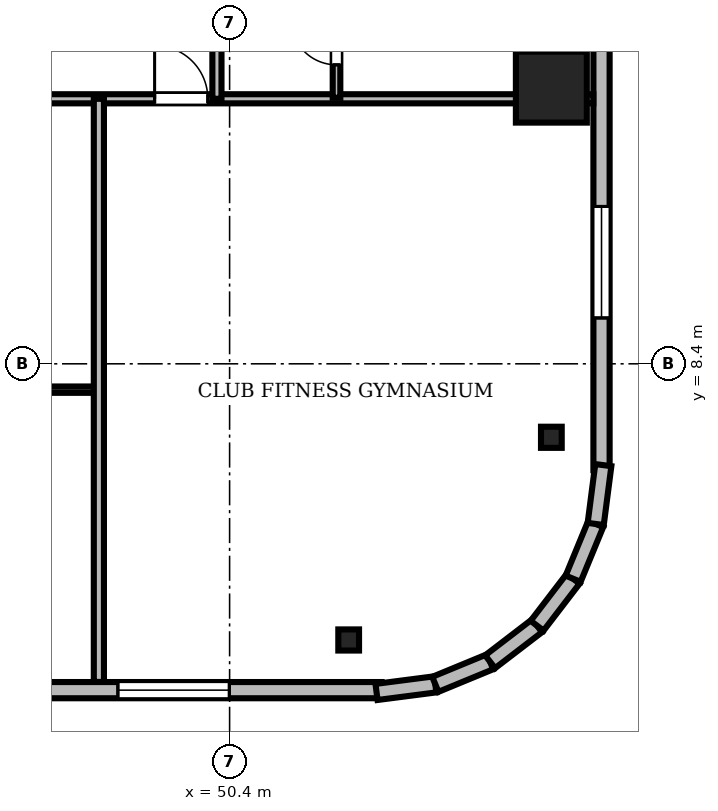
"""IFC4 building model, lengths in metres.
Left out: names, types, materials, properties, quantities, classifications, styles, units other than length and angle.
Written with IfcOpenShell. Run it as: python <this file> out.ifc"""

import sys

from ifc_helpers import new_model, si_unit, direction, frame, frame_2d, origin, origin_2d, place, context, subcontext, project, spatial, rectangle, i_section, extrude, source, transform, mapped, element, fill, save


model = new_model("IFC4")
c1 = context("Model", 3, precision=1e-05, world=origin(), true_north=direction((0.0, 1.0)))
c2 = subcontext(c1, "Body", "Model", "MODEL_VIEW")
j1 = project(units=[si_unit("LENGTHUNIT", "METRE"), si_unit("PLANEANGLEUNIT", "RADIAN")], contexts=[c1])
p1 = place(None, origin())
s1 = spatial("IfcSite", under=j1, at=p1, CompositionType="ELEMENT")
p2 = place(p1, origin())
s2 = spatial("IfcBuilding", under=s1, at=p2, CompositionType="ELEMENT")
p3 = place(p2, frame((0.0, 0.0, 199.8)))
s3 = spatial("IfcBuildingStorey", under=s2, at=p3, CompositionType="ELEMENT", Elevation=199.8)
m1 = source(origin(), c2, "Body", "SweptSolid", [
    extrude(rectangle(XDim=1.4, YDim=1.4, at=origin_2d()), origin(), (0.0, 0.0, 1.0), 3.53),
])
p4 = place(p3, frame((56.75, 13.86, 0.0), z_axis=(0.0, 0.0, 1.0), x_axis=(1.0, 0.0, 0.0)))
e1 = element("IfcColumn", 1, at=p4, inside=s3, PredefinedType="COLUMN", context=c2, shape_type="MappedRepresentation", body=[
    mapped(m1, transform((0.0, 0.0, 0.0), scale=1.0)),
])
m2 = source(origin(), c2, "Body", "SweptSolid", [
    extrude(i_section(OverallWidth=0.409, OverallDepth=0.417, WebThickness=0.021, FlangeThickness=0.033, FilletRadius=0.015, at=origin_2d()), origin(), (0.0, 0.0, 1.0), 3.53),
])
for number, where, z_axis, x_axis in (
    (2, (52.75, 2.95, 0.0), (0.0, 0.0, 1.0), (1.0, 0.0, 0.0)),
    (3, (56.75, 6.95, 0.0), (0.0, 0.0, 1.0), (1.0, 0.0, 0.0)),
):
    element("IfcColumn", number, at=place(p3, frame(where, z_axis=z_axis, x_axis=x_axis)), inside=s3, PredefinedType="COLUMN", context=c2, shape_type="MappedRepresentation", body=[
        mapped(m2, transform((0.0, 0.0, 0.0), scale=1.0)),
    ])
m3 = source(origin(), c2, "Body", "SweptSolid", [
    extrude(rectangle(XDim=15.6, YDim=0.32, at=frame_2d((7.8, 0.0))), origin(), (0.0, 0.0, 1.0), 3.53),
])
p5 = place(p3, frame((37.8, 1.96, 0.0), z_axis=(0.0, 0.0, 1.0), x_axis=(1.0, 0.0, 0.0)))
e4 = element("IfcWall", 4, at=p5, inside=s3, PredefinedType="SOLIDWALL", context=c2, shape_type="MappedRepresentation", body=[
    mapped(m3, transform((0.0, 0.0, 0.0), scale=1.0)),
])
m4 = source(origin(), c2, "Body", "SweptSolid", [
    extrude(rectangle(XDim=1.4, YDim=2.3, at=frame_2d((0.7, 1.15))), frame((0.0, 0.17, 0.0), z_axis=(0.0, -1.0, 0.0), x_axis=(1.0, 0.0, 0.0)), (0.0, 0.0, 1.0), 0.34),
])
p6 = place(p5, frame((4.59, 0.0, 0.0)))
e5 = element("IfcOpeningElement", 5, at=p6, cuts=e4, PredefinedType="OPENING", context=c2, shape_type="MappedRepresentation", body=[
    mapped(m4, transform((0.0, 0.0, 0.0), scale=1.0)),
])
m5 = source(origin(), c2, "Body", "SweptSolid", [
    extrude(rectangle(XDim=2.2, YDim=2.4, at=frame_2d((1.1, 1.2))), frame((0.0, 0.17, 0.0), z_axis=(0.0, -1.0, 0.0), x_axis=(1.0, 0.0, 0.0)), (0.0, 0.0, 1.0), 0.34),
])
p7 = place(p5, frame((10.395, 0.0, 0.72)))
e6 = element("IfcOpeningElement", 6, at=p7, cuts=e4, PredefinedType="OPENING", context=c2, shape_type="MappedRepresentation", body=[
    mapped(m5, transform((0.0, 0.0, 0.0), scale=1.0)),
])
p8 = place(p3, frame((57.74, 6.3, 0.0), z_axis=(0.0, 0.0, 1.0), x_axis=(0.0, 1.0, 0.0)))
e7 = element("IfcWall", 7, at=p8, inside=s3, PredefinedType="SOLIDWALL", context=c2, shape_type="MappedRepresentation", body=[
    mapped(m3, transform((0.0, 0.0, 0.0), scale=1.0)),
])
p9 = place(p8, frame((9.61, 0.0, 0.0)))
e8 = element("IfcOpeningElement", 8, at=p9, cuts=e7, PredefinedType="OPENING", context=c2, shape_type="MappedRepresentation", body=[
    mapped(m4, transform((0.0, 0.0, 0.0), scale=1.0)),
])
p10 = place(p8, frame((3.005, 0.0, 0.72)))
e9 = element("IfcOpeningElement", 9, at=p10, cuts=e7, PredefinedType="OPENING", context=c2, shape_type="MappedRepresentation", body=[
    mapped(m5, transform((0.0, 0.0, 0.0), scale=1.0)),
])
m6 = source(origin(), c2, "Body", "SweptSolid", [
    extrude(rectangle(XDim=1.17, YDim=0.32, at=frame_2d((0.585, 0.0))), origin(), (0.0, 0.0, 1.0), 3.53),
])
p11 = place(p3, frame((53.3, 1.925, 0.0), z_axis=(0.0, 0.0, 1.0), x_axis=(0.991762485493, 0.128090485085, 0.0)))
e10 = element("IfcWall", 10, at=p11, inside=s3, PredefinedType="SOLIDWALL", context=c2, shape_type="MappedRepresentation", body=[
    mapped(m6, transform((0.0, 0.0, 0.0), scale=1.0)),
])
m7 = source(origin(), c2, "Body", "SweptSolid", [
    extrude(rectangle(XDim=1.169, YDim=0.32, at=frame_2d((0.585, 0.0))), origin(), (0.0, 0.0, 1.0), 3.53),
])
p12 = place(p3, frame((54.46, 2.074, 0.0), z_axis=(0.0, 0.0, 1.0), x_axis=(0.924479075121, 0.381232789334, 0.0)))
e11 = element("IfcWall", 11, at=p12, inside=s3, PredefinedType="SOLIDWALL", context=c2, shape_type="MappedRepresentation", body=[
    mapped(m7, transform((0.0, 0.0, 0.0), scale=1.0)),
])
m8 = source(origin(), c2, "Body", "SweptSolid", [
    extrude(rectangle(XDim=1.169, YDim=0.32, at=frame_2d((0.584, 0.0))), origin(), (0.0, 0.0, 1.0), 3.53),
])
p13 = place(p3, frame((55.541, 2.52, 0.0), z_axis=(0.0, 0.0, 1.0), x_axis=(0.793663520347, 0.608356981114, 0.0)))
e12 = element("IfcWall", 12, at=p13, inside=s3, PredefinedType="SOLIDWALL", context=c2, shape_type="MappedRepresentation", body=[
    mapped(m8, transform((0.0, 0.0, 0.0), scale=1.0)),
])
m9 = source(origin(), c2, "Body", "SweptSolid", [
    extrude(rectangle(XDim=1.169, YDim=0.32, at=frame_2d((0.584, 0.0))), origin(), (0.0, 0.0, 1.0), 3.53),
])
for number, where, z_axis, x_axis in (
    (13, (56.469, 3.231, 0.0), (0.0, 0.0, 1.0), (0.608, 0.794, 0.0)),
    (14, (57.18, 4.159, 0.0), (0.0, 0.0, 1.0), (0.381, 0.925, 0.0)),
):
    element("IfcWall", number, at=place(p3, frame(where, z_axis=z_axis, x_axis=x_axis)), inside=s3, PredefinedType="SOLIDWALL", context=c2, shape_type="MappedRepresentation", body=[
        mapped(m9, transform((0.0, 0.0, 0.0), scale=1.0)),
    ])
m10 = source(origin(), c2, "Body", "SweptSolid", [
    extrude(rectangle(XDim=1.171, YDim=0.32, at=frame_2d((0.585, 0.0))), origin(), (0.0, 0.0, 1.0), 3.53),
])
p14 = place(p3, frame((57.625, 5.24, 0.0), z_axis=(0.0, 0.0, 1.0), x_axis=(0.128269133229, 0.991739395941, 0.0)))
e15 = element("IfcWall", 15, at=p14, inside=s3, PredefinedType="SOLIDWALL", context=c2, shape_type="MappedRepresentation", body=[
    mapped(m10, transform((0.0, 0.0, 0.0), scale=1.0)),
])
m11 = source(origin(), c2, "Body", "SweptSolid", [
    extrude(rectangle(XDim=46.156, YDim=0.18, at=frame_2d((23.078, 0.0))), origin(), (0.0, 0.0, 1.0), 2.772),
])
p15 = place(p3, frame((11.422, 13.63, 0.0), z_axis=(0.0, 0.0, 1.0), x_axis=(1.0, 0.0, 0.0)))
e16 = element("IfcWall", 16, at=p15, inside=s3, PredefinedType="PARTITIONING", context=c2, shape_type="MappedRepresentation", body=[
    mapped(m11, transform((0.0, 0.0, 0.0), scale=1.0)),
])
m12 = source(origin(), c2, "Body", "SweptSolid", [
    extrude(rectangle(XDim=1.05, YDim=2.2, at=frame_2d((0.525, 1.1))), frame((0.0, 0.1, 0.0), z_axis=(0.0, -1.0, 0.0), x_axis=(1.0, 0.0, 0.0)), (0.0, 0.0, 1.0), 0.2),
])
p16 = place(p15, frame((9.078, 0.0, 0.0)))
e17 = element("IfcOpeningElement", 17, at=p16, cuts=e16, PredefinedType="OPENING", context=c2, shape_type="MappedRepresentation", body=[
    mapped(m12, transform((0.0, 0.0, 0.0), scale=1.0)),
])
p17 = place(p15, frame((11.755, 0.0, 0.0)))
e18 = element("IfcOpeningElement", 18, at=p17, cuts=e16, PredefinedType="OPENING", context=c2, shape_type="MappedRepresentation", body=[
    mapped(m12, transform((0.0, 0.0, 0.0), scale=1.0)),
])
p18 = place(p15, frame((16.199, 0.0, 0.0)))
e19 = element("IfcOpeningElement", 19, at=p18, cuts=e16, PredefinedType="OPENING", context=c2, shape_type="MappedRepresentation", body=[
    mapped(m12, transform((0.0, 0.0, 0.0), scale=1.0)),
])
p19 = place(p15, frame((21.393, 0.0, 0.0)))
e20 = element("IfcOpeningElement", 20, at=p19, cuts=e16, PredefinedType="OPENING", context=c2, shape_type="MappedRepresentation", body=[
    mapped(m12, transform((0.0, 0.0, 0.0), scale=1.0)),
])
m13 = source(origin(), c2, "Body", "SweptSolid", [
    extrude(rectangle(XDim=0.95, YDim=2.15, at=frame_2d((0.475, 1.075))), frame((0.0, 0.1, 0.0), z_axis=(0.0, -1.0, 0.0), x_axis=(1.0, 0.0, 0.0)), (0.0, 0.0, 1.0), 0.2),
])
p20 = place(p15, frame((27.812, 0.0, 0.0)))
e21 = element("IfcOpeningElement", 21, at=p20, cuts=e16, PredefinedType="OPENING", context=c2, shape_type="MappedRepresentation", body=[
    mapped(m13, transform((0.0, 0.0, 0.0), scale=1.0)),
])
p21 = place(p15, frame((32.531, 0.0, 0.0)))
e22 = element("IfcOpeningElement", 22, at=p21, cuts=e16, PredefinedType="OPENING", context=c2, shape_type="MappedRepresentation", body=[
    mapped(m12, transform((0.0, 0.0, 0.0), scale=1.0)),
])
p22 = place(p15, frame((37.498, 0.0, 0.0)))
e23 = element("IfcOpeningElement", 23, at=p22, cuts=e16, PredefinedType="OPENING", context=c2, shape_type="MappedRepresentation", body=[
    mapped(m12, transform((0.0, 0.0, 0.0), scale=1.0)),
])
m14 = source(origin(), c2, "Body", "SweptSolid", [
    extrude(rectangle(XDim=27.47, YDim=0.18, at=frame_2d((13.735, 0.0))), origin(), (0.0, 0.0, 1.0), 2.972),
])
p23 = place(p3, frame((50.15, 13.63, 0.0), z_axis=(0.0, 0.0, 1.0), x_axis=(0.0, 1.0, 0.0)))
e24 = element("IfcWall", 24, at=p23, inside=s3, PredefinedType="PARTITIONING", context=c2, shape_type="MappedRepresentation", body=[
    mapped(m14, transform((0.0, 0.0, 0.0), scale=1.0)),
])
p24 = place(p23, frame((4.071, 0.0, 0.0)))
e25 = element("IfcOpeningElement", 25, at=p24, cuts=e24, PredefinedType="OPENING", context=c2, shape_type="MappedRepresentation", body=[
    mapped(m12, transform((0.0, 0.0, 0.0), scale=1.0)),
])
p25 = place(p23, frame((10.884, 0.0, 0.0)))
e26 = element("IfcOpeningElement", 26, at=p25, cuts=e24, PredefinedType="OPENING", context=c2, shape_type="MappedRepresentation", body=[
    mapped(m12, transform((0.0, 0.0, 0.0), scale=1.0)),
])
p26 = place(p23, frame((17.696, 0.0, 0.0)))
e27 = element("IfcOpeningElement", 27, at=p26, cuts=e24, PredefinedType="OPENING", context=c2, shape_type="MappedRepresentation", body=[
    mapped(m12, transform((0.0, 0.0, 0.0), scale=1.0)),
])
p27 = place(p23, frame((24.509, 0.0, 0.0)))
e28 = element("IfcOpeningElement", 28, at=p27, cuts=e24, PredefinedType="OPENING", context=c2, shape_type="MappedRepresentation", body=[
    mapped(m12, transform((0.0, 0.0, 0.0), scale=1.0)),
])
m15 = source(origin(), c2, "Body", "SweptSolid", [
    extrude(rectangle(XDim=6.694, YDim=0.125, at=frame_2d((3.347, 0.0))), origin(), (0.0, 0.0, 1.0), 2.972),
])
p28 = place(p3, frame((41.126, 7.89, 0.0), z_axis=(0.0, 0.0, 1.0), x_axis=(1.0, 0.0, 0.0)))
e29 = element("IfcWall", 29, at=p28, inside=s3, PredefinedType="PARTITIONING", context=c2, shape_type="MappedRepresentation", body=[
    mapped(m15, transform((0.0, 0.0, 0.0), scale=1.0)),
])
m16 = source(origin(), c2, "Body", "SweptSolid", [
    extrude(rectangle(XDim=0.95, YDim=2.15, at=frame_2d((0.475, 1.075))), frame((0.0, 0.073, 0.0), z_axis=(0.0, -1.0, 0.0), x_axis=(1.0, 0.0, 0.0)), (0.0, 0.0, 1.0), 0.145),
])
p29 = place(p28, frame((2.867, 0.0, 0.0)))
e30 = element("IfcOpeningElement", 30, at=p29, cuts=e29, PredefinedType="OPENING", context=c2, shape_type="MappedRepresentation", body=[
    mapped(m16, transform((0.0, 0.0, 0.0), scale=1.0)),
])
m17 = source(origin(), c2, "Body", "SweptSolid", [
    extrude(rectangle(XDim=2.29, YDim=0.15, at=frame_2d((1.145, 0.0))), origin(), (0.0, 0.0, 1.0), 2.972),
])
p30 = place(p3, frame((52.51, 13.65, 0.0), z_axis=(0.0, 0.0, 1.0), x_axis=(0.0, 1.0, 0.0)))
e31 = element("IfcWall", 31, at=p30, inside=s3, PredefinedType="PARTITIONING", context=c2, shape_type="MappedRepresentation", body=[
    mapped(m17, transform((0.0, 0.0, 0.0), scale=1.0)),
])
m18 = source(origin(), c2, "Body", "SweptSolid", [
    extrude(rectangle(XDim=0.9, YDim=2.1, at=frame_2d((0.45, 1.05))), frame((0.0, 0.085, 0.0), z_axis=(0.0, -1.0, 0.0), x_axis=(1.0, 0.0, 0.0)), (0.0, 0.0, 1.0), 0.17),
])
p31 = place(p30, frame((0.65, 0.0, 0.0)))
e32 = element("IfcOpeningElement", 32, at=p31, cuts=e31, PredefinedType="OPENING", context=c2, shape_type="MappedRepresentation", body=[
    mapped(m18, transform((0.0, 0.0, 0.0), scale=1.0)),
])
m19 = source(origin(), c2, "Body", "SweptSolid", [
    extrude(rectangle(XDim=11.508, YDim=0.2, at=frame_2d((5.754, 0.0))), origin(), (0.0, 0.0, 1.0), 2.772),
])
p32 = place(p3, frame((47.82, 2.122, 0.0), z_axis=(0.0, 0.0, 1.0), x_axis=(0.0, 1.0, 0.0)))
e33 = element("IfcWall", 33, at=p32, inside=s3, PredefinedType="PARTITIONING", context=c2, shape_type="MappedRepresentation", body=[
    mapped(m19, transform((0.0, 0.0, 0.0), scale=1.0)),
])
m20 = source(origin(), c2, "Body", "SweptSolid", [
    extrude(rectangle(XDim=2.2, YDim=2.4, at=frame_2d((1.1, 1.2))), frame((0.0, 0.03, 0.0), z_axis=(0.0, -1.0, 0.0), x_axis=(1.0, 0.0, 0.0)), (0.0, 0.0, 1.0), 0.06),
])
p33 = place(p7, origin())
e34 = element("IfcWindow", 34, at=p33, inside=s3, PartitioningType="SINGLE_PANEL", PredefinedType="WINDOW", context=c2, shape_type="MappedRepresentation", body=[
    mapped(m20, transform((0.0, 0.0, 0.0), scale=1.0)),
])
fill(e6, e34)
p34 = place(p10, origin())
e35 = element("IfcWindow", 35, at=p34, inside=s3, PartitioningType="SINGLE_PANEL", PredefinedType="WINDOW", context=c2, shape_type="MappedRepresentation", body=[
    mapped(m20, transform((0.0, 0.0, 0.0), scale=1.0)),
])
fill(e9, e35)
m21 = source(origin(), c2, "Body", "SweptSolid", [
    extrude(rectangle(XDim=1.05, YDim=2.2, at=frame_2d((0.525, 1.1))), frame((0.0, 0.025, 0.0), z_axis=(0.0, -1.0, 0.0), x_axis=(1.0, 0.0, 0.0)), (0.0, 0.0, 1.0), 0.05),
])
p35 = place(p22, origin())
e36 = element("IfcDoor", 36, at=p35, inside=s3, OperationType="SINGLE_SWING_LEFT", PredefinedType="DOOR", context=c2, shape_type="MappedRepresentation", body=[
    mapped(m21, transform((0.0, 0.0, 0.0), scale=1.0)),
])
fill(e23, e36)
m22 = source(origin(), c2, "Body", "SweptSolid", [
    extrude(rectangle(XDim=0.9, YDim=2.1, at=frame_2d((0.45, 1.05))), frame((0.0, 0.025, 0.0), z_axis=(0.0, -1.0, 0.0), x_axis=(1.0, 0.0, 0.0)), (0.0, 0.0, 1.0), 0.05),
])
p36 = place(p31, origin())
e37 = element("IfcDoor", 37, at=p36, inside=s3, OperationType="SINGLE_SWING_RIGHT", PredefinedType="DOOR", context=c2, shape_type="MappedRepresentation", body=[
    mapped(m22, transform((0.0, 0.0, 0.0), scale=1.0)),
])
fill(e32, e37)
save(model, sys.argv[1])
